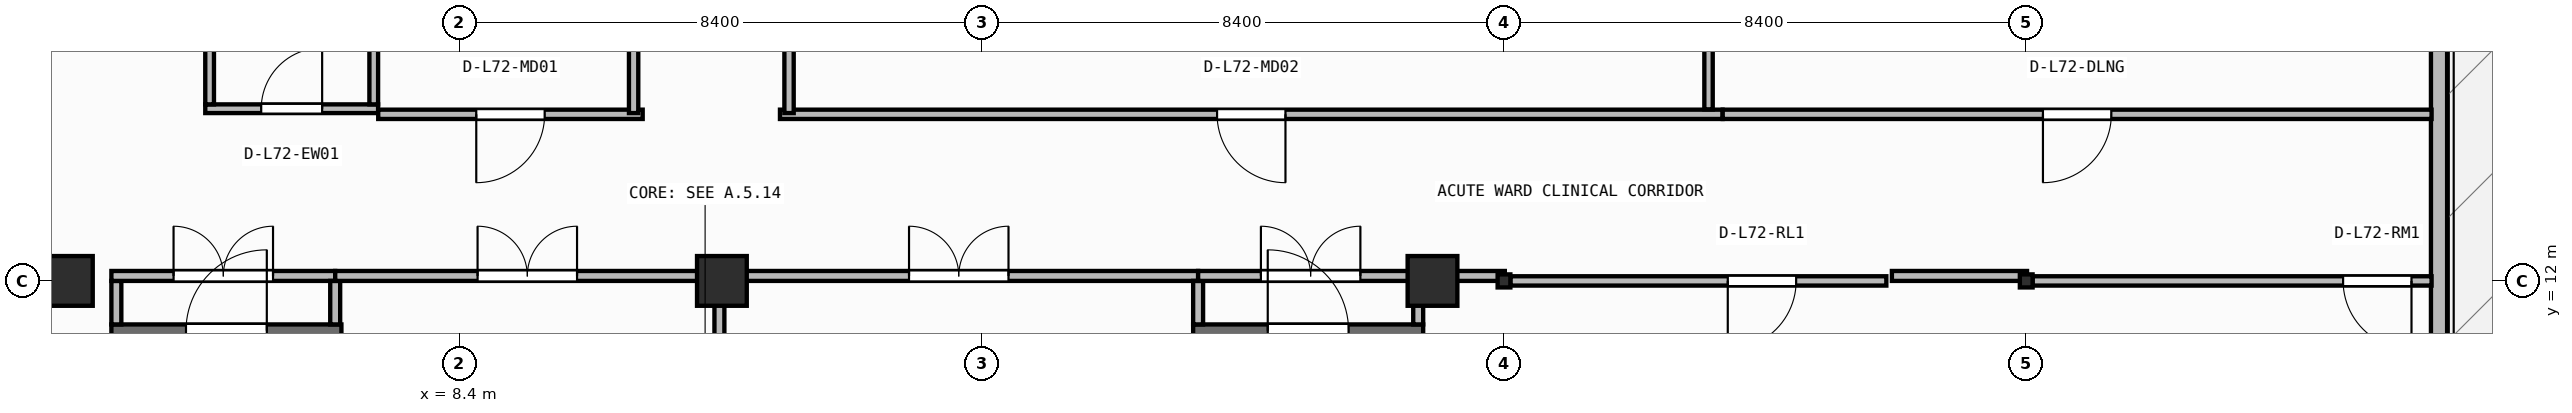
"""IFC4 building model, lengths in metres.
Left out: names, types, materials, properties, quantities, classifications, styles, units other than length and angle.
Written with IfcOpenShell. Run it as: python <this file> out.ifc"""

import sys

from ifc_helpers import new_model, si_unit, direction, frame, frame_2d, origin, origin_2d, place, context, subcontext, project, spatial, rectangle, i_section, extrude, element, fill, save


model = new_model("IFC4")
c1 = context("Model", 3, precision=1e-05, world=origin(), true_north=direction((0.0, 1.0)))
c2 = subcontext(c1, "Body", "Model", "MODEL_VIEW")
j1 = project(units=[si_unit("LENGTHUNIT", "METRE"), si_unit("PLANEANGLEUNIT", "RADIAN")], contexts=[c1])
p1 = place(None, origin())
s1 = spatial("IfcSite", under=j1, at=p1, CompositionType="ELEMENT")
p2 = place(p1, origin())
s2 = spatial("IfcBuilding", under=s1, at=p2, CompositionType="ELEMENT")
p3 = place(p2, frame((0.0, 0.0, 292.1)))
s3 = spatial("IfcBuildingStorey", under=s2, at=p3, CompositionType="ELEMENT", Elevation=292.1)
for number, where, z_axis, x_axis in (
    (1, (2.1, 12.0, 0.0), (0.0, 0.0, 1.0), (1.0, 0.0, 0.0)),
    (2, (12.62, 12.0, 0.0), (0.0, 0.0, 1.0), (1.0, 0.0, 0.0)),
    (3, (24.05, 12.0, 0.0), (0.0, 0.0, 1.0), (1.0, 0.0, 0.0)),
):
    element("IfcColumn", number, at=place(p3, frame(where, z_axis=z_axis, x_axis=x_axis)), inside=s3, PredefinedType="COLUMN", context=c2, shape_type="SweptSolid", body=[
        extrude(rectangle(XDim=0.8, YDim=0.8, at=origin_2d()), origin(), (0.0, 0.0, 1.0), 3.95),
    ])
for number, where, z_axis, x_axis in (
    (4, (25.2, 12.0, 0.0), (0.0, 0.0, 1.0), (1.0, 0.0, 0.0)),
    (5, (33.6, 12.0, 0.0), (0.0, 0.0, 1.0), (1.0, 0.0, 0.0)),
):
    element("IfcColumn", number, at=place(p3, frame(where, z_axis=z_axis, x_axis=x_axis)), inside=s3, PredefinedType="COLUMN", context=c2, shape_type="SweptSolid", body=[
        extrude(i_section(OverallWidth=0.205, OverallDepth=0.21, WebThickness=0.009, FlangeThickness=0.014, FilletRadius=0.011, at=origin_2d()), origin(), (0.0, 0.0, 1.0), 3.95),
    ])
p4 = place(p3, frame((40.24, 4.86, 0.0), z_axis=(0.0, 0.0, 1.0), x_axis=(0.0, 1.0, 0.0)))
e6 = element("IfcWall", 6, at=p4, inside=s3, PredefinedType="STANDARD", context=c2, shape_type="SweptSolid", body=[
    extrude(rectangle(XDim=20.48, YDim=0.26, at=frame_2d((10.24, 0.0))), origin(), (0.0, 0.0, 1.0), 3.71),
])
p5 = place(p4, frame((11.44, 0.0, 0.0)))
e7 = element("IfcOpeningElement", 7, at=p5, cuts=e6, PredefinedType="OPENING", context=c2, shape_type="SweptSolid", body=[
    extrude(rectangle(XDim=1.3, YDim=2.15, at=frame_2d((0.65, 1.075))), frame((0.0, 0.14, 0.0), z_axis=(0.0, -1.0, 0.0), x_axis=(1.0, 0.0, 0.0)), (0.0, 0.0, 1.0), 0.28),
])
p6 = place(p3, frame((2.8, 11.2, 0.0), z_axis=(0.0, 0.0, 1.0), x_axis=(1.0, 0.0, 0.0)))
e8 = element("IfcWall", 8, at=p6, inside=s3, PredefinedType="SHEAR", context=c2, shape_type="SweptSolid", body=[
    extrude(rectangle(XDim=3.7, YDim=0.2, at=frame_2d((1.85, 0.0))), origin(), (0.0, 0.0, 1.0), 3.71),
])
p7 = place(p6, frame((1.2, 0.0, 0.0)))
e9 = element("IfcOpeningElement", 9, at=p7, cuts=e8, PredefinedType="OPENING", context=c2, shape_type="SweptSolid", body=[
    extrude(rectangle(XDim=1.3, YDim=2.15, at=frame_2d((0.65, 1.075))), frame((0.0, 0.11, 0.0), z_axis=(0.0, -1.0, 0.0), x_axis=(1.0, 0.0, 0.0)), (0.0, 0.0, 1.0), 0.22),
])
p8 = place(p3, frame((20.2, 11.2, 0.0), z_axis=(0.0, 0.0, 1.0), x_axis=(1.0, 0.0, 0.0)))
e10 = element("IfcWall", 10, at=p8, inside=s3, PredefinedType="SHEAR", context=c2, shape_type="SweptSolid", body=[
    extrude(rectangle(XDim=3.7, YDim=0.2, at=frame_2d((1.85, 0.0))), origin(), (0.0, 0.0, 1.0), 3.71),
])
p9 = place(p8, frame((1.2, 0.0, 0.0)))
e11 = element("IfcOpeningElement", 11, at=p9, cuts=e10, PredefinedType="OPENING", context=c2, shape_type="SweptSolid", body=[
    extrude(rectangle(XDim=1.3, YDim=2.15, at=frame_2d((0.65, 1.075))), frame((0.0, 0.11, 0.0), z_axis=(0.0, -1.0, 0.0), x_axis=(1.0, 0.0, 0.0)), (0.0, 0.0, 1.0), 0.22),
])
p10 = place(p3, frame((2.88, 11.3, 0.0), z_axis=(0.0, 0.0, 1.0), x_axis=(0.0, 1.0, 0.0)))
e12 = element("IfcWall", 12, at=p10, inside=s3, PredefinedType="PARTITIONING", context=c2, shape_type="SweptSolid", body=[
    extrude(rectangle(XDim=0.7, YDim=0.16, at=frame_2d((0.35, 0.0))), origin(), (0.0, 0.0, 1.0), 3.71),
])
p11 = place(p3, frame((2.8, 12.08, 0.0), z_axis=(0.0, 0.0, 1.0), x_axis=(1.0, 0.0, 0.0)))
e13 = element("IfcWall", 13, at=p11, inside=s3, PredefinedType="PARTITIONING", context=c2, shape_type="SweptSolid", body=[
    extrude(rectangle(XDim=3.6, YDim=0.16, at=frame_2d((1.8, 0.0))), origin(), (0.0, 0.0, 1.0), 3.157),
])
p12 = place(p11, frame((1.0, 0.0, 0.0)))
e14 = element("IfcOpeningElement", 14, at=p12, cuts=e13, PredefinedType="OPENING", context=c2, shape_type="SweptSolid", body=[
    extrude(rectangle(XDim=1.6, YDim=2.05, at=frame_2d((0.8, 1.025))), frame((0.0, 0.09, 0.0), z_axis=(0.0, -1.0, 0.0), x_axis=(1.0, 0.0, 0.0)), (0.0, 0.0, 1.0), 0.18),
])
p13 = place(p3, frame((6.4, 11.3, 0.0), z_axis=(0.0, 0.0, 1.0), x_axis=(0.0, 1.0, 0.0)))
e15 = element("IfcWall", 15, at=p13, inside=s3, PredefinedType="PARTITIONING", context=c2, shape_type="SweptSolid", body=[
    extrude(rectangle(XDim=0.7, YDim=0.16, at=frame_2d((0.35, 0.0))), origin(), (0.0, 0.0, 1.0), 3.71),
])
p14 = place(p3, frame((6.4, 12.08, 0.0), z_axis=(0.0, 0.0, 1.0), x_axis=(1.0, 0.0, 0.0)))
e16 = element("IfcWall", 16, at=p14, inside=s3, PredefinedType="PARTITIONING", context=c2, shape_type="SweptSolid", body=[
    extrude(rectangle(XDim=6.18, YDim=0.16, at=frame_2d((3.09, 0.0))), origin(), (0.0, 0.0, 1.0), 3.157),
])
p15 = place(p14, frame((2.29, 0.0, 0.0)))
e17 = element("IfcOpeningElement", 17, at=p15, cuts=e16, PredefinedType="OPENING", context=c2, shape_type="SweptSolid", body=[
    extrude(rectangle(XDim=1.6, YDim=2.05, at=frame_2d((0.8, 1.025))), frame((0.0, 0.09, 0.0), z_axis=(0.0, -1.0, 0.0), x_axis=(1.0, 0.0, 0.0)), (0.0, 0.0, 1.0), 0.18),
])
p16 = place(p3, frame((12.58, 9.21, 0.0), z_axis=(0.0, 0.0, 1.0), x_axis=(0.0, 1.0, 0.0)))
e18 = element("IfcWall", 18, at=p16, inside=s3, PredefinedType="PARTITIONING", context=c2, shape_type="SweptSolid", body=[
    extrude(rectangle(XDim=2.79, YDim=0.16, at=frame_2d((1.395, 0.0))), origin(), (0.0, 0.0, 1.0), 3.71),
])
p17 = place(p3, frame((12.58, 12.08, 0.0), z_axis=(0.0, 0.0, 1.0), x_axis=(1.0, 0.0, 0.0)))
e19 = element("IfcWall", 19, at=p17, inside=s3, PredefinedType="PARTITIONING", context=c2, shape_type="SweptSolid", body=[
    extrude(rectangle(XDim=7.7, YDim=0.16, at=frame_2d((3.85, 0.0))), origin(), (0.0, 0.0, 1.0), 3.157),
])
p18 = place(p17, frame((3.05, 0.0, 0.0)))
e20 = element("IfcOpeningElement", 20, at=p18, cuts=e19, PredefinedType="OPENING", context=c2, shape_type="SweptSolid", body=[
    extrude(rectangle(XDim=1.6, YDim=2.05, at=frame_2d((0.8, 1.025))), frame((0.0, 0.09, 0.0), z_axis=(0.0, -1.0, 0.0), x_axis=(1.0, 0.0, 0.0)), (0.0, 0.0, 1.0), 0.18),
])
p19 = place(p3, frame((20.28, 11.3, 0.0), z_axis=(0.0, 0.0, 1.0), x_axis=(0.0, 1.0, 0.0)))
e21 = element("IfcWall", 21, at=p19, inside=s3, PredefinedType="PARTITIONING", context=c2, shape_type="SweptSolid", body=[
    extrude(rectangle(XDim=0.7, YDim=0.16, at=frame_2d((0.35, 0.0))), origin(), (0.0, 0.0, 1.0), 3.71),
])
p20 = place(p3, frame((20.28, 12.08, 0.0), z_axis=(0.0, 0.0, 1.0), x_axis=(1.0, 0.0, 0.0)))
e22 = element("IfcWall", 22, at=p20, inside=s3, PredefinedType="PARTITIONING", context=c2, shape_type="SweptSolid", body=[
    extrude(rectangle(XDim=3.62, YDim=0.16, at=frame_2d((1.81, 0.0))), origin(), (0.0, 0.0, 1.0), 3.157),
])
p21 = place(p20, frame((1.01, 0.0, 0.0)))
e23 = element("IfcOpeningElement", 23, at=p21, cuts=e22, PredefinedType="OPENING", context=c2, shape_type="SweptSolid", body=[
    extrude(rectangle(XDim=1.6, YDim=2.05, at=frame_2d((0.8, 1.025))), frame((0.0, 0.09, 0.0), z_axis=(0.0, -1.0, 0.0), x_axis=(1.0, 0.0, 0.0)), (0.0, 0.0, 1.0), 0.18),
])
p22 = place(p3, frame((23.82, 11.3, 0.0), z_axis=(0.0, 0.0, 1.0), x_axis=(0.0, 1.0, 0.0)))
e24 = element("IfcWall", 24, at=p22, inside=s3, PredefinedType="PARTITIONING", context=c2, shape_type="SweptSolid", body=[
    extrude(rectangle(XDim=0.7, YDim=0.16, at=frame_2d((0.35, 0.0))), origin(), (0.0, 0.0, 1.0), 3.71),
])
p23 = place(p3, frame((4.31, 14.77, 0.0), z_axis=(0.0, 0.0, 1.0), x_axis=(1.0, 0.0, 0.0)))
e25 = element("IfcWall", 25, at=p23, inside=s3, PredefinedType="PARTITIONING", context=c2, shape_type="SweptSolid", body=[
    extrude(rectangle(XDim=2.78, YDim=0.14, at=frame_2d((1.39, 0.0))), origin(), (0.0, 0.0, 1.0), 3.71),
])
p24 = place(p23, frame((0.9, 0.0, 0.0)))
e26 = element("IfcOpeningElement", 26, at=p24, cuts=e25, PredefinedType="OPENING", context=c2, shape_type="SweptSolid", body=[
    extrude(rectangle(XDim=0.98, YDim=2.1, at=frame_2d((0.49, 1.05))), frame((0.0, 0.08, 0.0), z_axis=(0.0, -1.0, 0.0), x_axis=(1.0, 0.0, 0.0)), (0.0, 0.0, 1.0), 0.16),
])
for number, where, z_axis, x_axis in (
    (27, (4.38, 14.84, 0.0), (0.0, 0.0, 1.0), (0.0, 1.0, 0.0)),
    (28, (7.02, 14.84, 0.0), (0.0, 0.0, 1.0), (0.0, 1.0, 0.0)),
):
    element("IfcWall", number, at=place(p3, frame(where, z_axis=z_axis, x_axis=x_axis)), inside=s3, PredefinedType="PARTITIONING", context=c2, shape_type="SweptSolid", body=[
        extrude(rectangle(XDim=2.2, YDim=0.14, at=frame_2d((1.1, 0.0))), origin(), (0.0, 0.0, 1.0), 3.71),
    ])
p25 = place(p3, frame((31.35, 12.0, 0.0), z_axis=(0.0, 0.0, 1.0), x_axis=(-1.0, 0.0, 0.0)))
e29 = element("IfcWall", 29, at=p25, inside=s3, PredefinedType="PARTITIONING", context=c2, shape_type="SweptSolid", body=[
    extrude(rectangle(XDim=6.048, YDim=0.15, at=frame_2d((3.024, 0.0))), origin(), (0.0, 0.0, 1.0), 3.157),
])
p26 = place(p25, frame((1.451, 0.0, 0.0)))
e30 = element("IfcOpeningElement", 30, at=p26, cuts=e29, PredefinedType="OPENING", context=c2, shape_type="SweptSolid", body=[
    extrude(rectangle(XDim=1.1, YDim=2.1, at=frame_2d((0.55, 1.05))), frame((0.0, 0.085, 0.0), z_axis=(0.0, -1.0, 0.0), x_axis=(1.0, 0.0, 0.0)), (0.0, 0.0, 1.0), 0.17),
])
p27 = place(p3, frame((40.12, 12.0, 0.0), z_axis=(0.0, 0.0, 1.0), x_axis=(-1.0, 0.0, 0.0)))
e31 = element("IfcWall", 31, at=p27, inside=s3, PredefinedType="PARTITIONING", context=c2, shape_type="SweptSolid", body=[
    extrude(rectangle(XDim=6.418, YDim=0.15, at=frame_2d((3.209, 0.0))), origin(), (0.0, 0.0, 1.0), 3.71),
])
p28 = place(p27, frame((0.323, 0.0, 0.0)))
e32 = element("IfcOpeningElement", 32, at=p28, cuts=e31, PredefinedType="OPENING", context=c2, shape_type="SweptSolid", body=[
    extrude(rectangle(XDim=1.1, YDim=2.1, at=frame_2d((0.55, 1.05))), frame((0.0, 0.085, 0.0), z_axis=(0.0, -1.0, 0.0), x_axis=(1.0, 0.0, 0.0)), (0.0, 0.0, 1.0), 0.17),
])
p29 = place(p3, frame((11.346, 14.68, 0.0), z_axis=(0.0, 0.0, 1.0), x_axis=(-1.0, 0.0, 0.0)))
e33 = element("IfcWall", 33, at=p29, inside=s3, PredefinedType="PARTITIONING", context=c2, shape_type="SweptSolid", body=[
    extrude(rectangle(XDim=4.254, YDim=0.15, at=frame_2d((2.127, 0.0))), origin(), (0.0, 0.0, 1.0), 3.71),
])
p30 = place(p29, frame((1.577, 0.0, 0.0)))
e34 = element("IfcOpeningElement", 34, at=p30, cuts=e33, PredefinedType="OPENING", context=c2, shape_type="SweptSolid", body=[
    extrude(rectangle(XDim=1.1, YDim=2.1, at=frame_2d((0.55, 1.05))), frame((0.0, 0.085, 0.0), z_axis=(0.0, -1.0, 0.0), x_axis=(1.0, 0.0, 0.0)), (0.0, 0.0, 1.0), 0.17),
])
p31 = place(p3, frame((28.716, 14.68, 0.0), z_axis=(0.0, 0.0, 1.0), x_axis=(-1.0, 0.0, 0.0)))
e35 = element("IfcWall", 35, at=p31, inside=s3, PredefinedType="PARTITIONING", context=c2, shape_type="SweptSolid", body=[
    extrude(rectangle(XDim=15.162, YDim=0.15, at=frame_2d((7.581, 0.0))), origin(), (0.0, 0.0, 1.0), 3.71),
])
p32 = place(p31, frame((7.031, 0.0, 0.0)))
e36 = element("IfcOpeningElement", 36, at=p32, cuts=e35, PredefinedType="OPENING", context=c2, shape_type="SweptSolid", body=[
    extrude(rectangle(XDim=1.1, YDim=2.1, at=frame_2d((0.55, 1.05))), frame((0.0, 0.085, 0.0), z_axis=(0.0, -1.0, 0.0), x_axis=(1.0, 0.0, 0.0)), (0.0, 0.0, 1.0), 0.17),
])
p33 = place(p3, frame((40.12, 14.68, 0.0), z_axis=(0.0, 0.0, 1.0), x_axis=(-1.0, 0.0, 0.0)))
e37 = element("IfcWall", 37, at=p33, inside=s3, PredefinedType="PARTITIONING", context=c2, shape_type="SweptSolid", body=[
    extrude(rectangle(XDim=11.402, YDim=0.15, at=frame_2d((5.701, 0.0))), origin(), (0.0, 0.0, 1.0), 3.71),
])
p34 = place(p33, frame((5.151, 0.0, 0.0)))
e38 = element("IfcOpeningElement", 38, at=p34, cuts=e37, PredefinedType="OPENING", context=c2, shape_type="SweptSolid", body=[
    extrude(rectangle(XDim=1.1, YDim=2.1, at=frame_2d((0.55, 1.05))), frame((0.0, 0.085, 0.0), z_axis=(0.0, -1.0, 0.0), x_axis=(1.0, 0.0, 0.0)), (0.0, 0.0, 1.0), 0.17),
])
p35 = place(p3, frame((11.2, 26.6, 0.0), z_axis=(0.0, 0.0, 1.0), x_axis=(0.0, -1.0, 0.0)))
e39 = element("IfcWall", 39, at=p35, inside=s3, PredefinedType="PARTITIONING", context=c2, shape_type="SweptSolid", body=[
    extrude(rectangle(XDim=11.9, YDim=0.15, at=frame_2d((5.95, 0.0))), origin(), (0.0, 0.0, 1.0), 3.71),
])
p36 = place(p3, frame((13.7, 14.7, 0.0), z_axis=(0.0, 0.0, 1.0), x_axis=(0.0, 1.0, 0.0)))
e40 = element("IfcWall", 40, at=p36, inside=s3, PredefinedType="PARTITIONING", context=c2, shape_type="SweptSolid", body=[
    extrude(rectangle(XDim=5.326, YDim=0.15, at=frame_2d((2.663, 0.0))), origin(), (0.0, 0.0, 1.0), 3.71),
])
p37 = place(p3, frame((28.49, 14.76, 0.0), z_axis=(0.0, 0.0, 1.0), x_axis=(0.0, 1.0, 0.0)))
e41 = element("IfcWall", 41, at=p37, inside=s3, PredefinedType="PARTITIONING", context=c2, shape_type="SweptSolid", body=[
    extrude(rectangle(XDim=5.04, YDim=0.135, at=frame_2d((2.52, 0.0))), origin(), (0.0, 0.0, 1.0), 3.71),
])
p38 = place(p3, frame((24.02, 12.08, 0.0), z_axis=(0.0, 0.0, 1.0), x_axis=(1.0, 0.0, 0.0)))
e42 = element("IfcWall", 42, at=p38, inside=s3, PredefinedType="PARTITIONING", context=c2, shape_type="SweptSolid", body=[
    extrude(rectangle(XDim=1.193, YDim=0.16, at=frame_2d((0.597, 0.0))), origin(), (0.0, 0.0, 1.0), 3.157),
])
p39 = place(p3, frame((31.439, 12.08, 0.0), z_axis=(0.0, 0.0, 1.0), x_axis=(1.0, 0.0, 0.0)))
e43 = element("IfcWall", 43, at=p39, inside=s3, PredefinedType="PARTITIONING", context=c2, shape_type="SweptSolid", body=[
    extrude(rectangle(XDim=2.174, YDim=0.16, at=frame_2d((1.087, 0.0))), origin(), (0.0, 0.0, 1.0), 3.157),
])
p40 = place(p7, origin())
e44 = element("IfcDoor", 44, at=p40, inside=s3, OperationType="SINGLE_SWING_RIGHT", PredefinedType="DOOR", context=c2, shape_type="SweptSolid", body=[
    extrude(rectangle(XDim=1.3, YDim=2.15, at=frame_2d((0.65, 1.075))), frame((0.0, 0.025, 0.0), z_axis=(0.0, -1.0, 0.0), x_axis=(1.0, 0.0, 0.0)), (0.0, 0.0, 1.0), 0.05),
])
fill(e9, e44)
p41 = place(p9, origin())
e45 = element("IfcDoor", 45, at=p41, inside=s3, OperationType="SINGLE_SWING_LEFT", PredefinedType="DOOR", context=c2, shape_type="SweptSolid", body=[
    extrude(rectangle(XDim=1.3, YDim=2.15, at=frame_2d((0.65, 1.075))), frame((0.0, 0.025, 0.0), z_axis=(0.0, -1.0, 0.0), x_axis=(1.0, 0.0, 0.0)), (0.0, 0.0, 1.0), 0.05),
])
fill(e11, e45)
p42 = place(p12, origin())
e46 = element("IfcDoor", 46, at=p42, inside=s3, OperationType="DOUBLE_DOOR_SINGLE_SWING", PredefinedType="DOOR", context=c2, shape_type="SweptSolid", body=[
    extrude(rectangle(XDim=1.6, YDim=2.05, at=frame_2d((0.8, 1.025))), frame((0.0, 0.025, 0.0), z_axis=(0.0, -1.0, 0.0), x_axis=(1.0, 0.0, 0.0)), (0.0, 0.0, 1.0), 0.05),
])
fill(e14, e46)
p43 = place(p15, origin())
e47 = element("IfcDoor", 47, at=p43, inside=s3, OperationType="DOUBLE_DOOR_SINGLE_SWING", PredefinedType="DOOR", context=c2, shape_type="SweptSolid", body=[
    extrude(rectangle(XDim=1.6, YDim=2.05, at=frame_2d((0.8, 1.025))), frame((0.0, 0.025, 0.0), z_axis=(0.0, -1.0, 0.0), x_axis=(1.0, 0.0, 0.0)), (0.0, 0.0, 1.0), 0.05),
])
fill(e17, e47)
p44 = place(p18, origin())
e48 = element("IfcDoor", 48, at=p44, inside=s3, OperationType="DOUBLE_DOOR_SINGLE_SWING", PredefinedType="DOOR", context=c2, shape_type="SweptSolid", body=[
    extrude(rectangle(XDim=1.6, YDim=2.05, at=frame_2d((0.8, 1.025))), frame((0.0, 0.025, 0.0), z_axis=(0.0, -1.0, 0.0), x_axis=(1.0, 0.0, 0.0)), (0.0, 0.0, 1.0), 0.05),
])
fill(e20, e48)
p45 = place(p21, origin())
e49 = element("IfcDoor", 49, at=p45, inside=s3, OperationType="DOUBLE_DOOR_SINGLE_SWING", PredefinedType="DOOR", context=c2, shape_type="SweptSolid", body=[
    extrude(rectangle(XDim=1.6, YDim=2.05, at=frame_2d((0.8, 1.025))), frame((0.0, 0.025, 0.0), z_axis=(0.0, -1.0, 0.0), x_axis=(1.0, 0.0, 0.0)), (0.0, 0.0, 1.0), 0.05),
])
fill(e23, e49)
p46 = place(p24, origin())
e50 = element("IfcDoor", 50, at=p46, inside=s3, OperationType="SINGLE_SWING_RIGHT", PredefinedType="DOOR", context=c2, shape_type="SweptSolid", body=[
    extrude(rectangle(XDim=0.98, YDim=2.1, at=frame_2d((0.49, 1.05))), frame((0.0, 0.025, 0.0), z_axis=(0.0, -1.0, 0.0), x_axis=(1.0, 0.0, 0.0)), (0.0, 0.0, 1.0), 0.05),
])
fill(e26, e50)
p47 = place(p26, origin())
e51 = element("IfcDoor", 51, at=p47, inside=s3, OperationType="SINGLE_SWING_RIGHT", PredefinedType="DOOR", context=c2, shape_type="SweptSolid", body=[
    extrude(rectangle(XDim=1.1, YDim=2.1, at=frame_2d((0.55, 1.05))), frame((0.0, 0.025, 0.0), z_axis=(0.0, -1.0, 0.0), x_axis=(1.0, 0.0, 0.0)), (0.0, 0.0, 1.0), 0.05),
])
fill(e30, e51)
p48 = place(p28, origin())
e52 = element("IfcDoor", 52, at=p48, inside=s3, OperationType="SINGLE_SWING_LEFT", PredefinedType="DOOR", context=c2, shape_type="SweptSolid", body=[
    extrude(rectangle(XDim=1.1, YDim=2.1, at=frame_2d((0.55, 1.05))), frame((0.0, 0.025, 0.0), z_axis=(0.0, -1.0, 0.0), x_axis=(1.0, 0.0, 0.0)), (0.0, 0.0, 1.0), 0.05),
])
fill(e32, e52)
p49 = place(p30, origin())
e53 = element("IfcDoor", 53, at=p49, inside=s3, OperationType="SINGLE_SWING_RIGHT", PredefinedType="DOOR", context=c2, shape_type="SweptSolid", body=[
    extrude(rectangle(XDim=1.1, YDim=2.1, at=frame_2d((0.55, 1.05))), frame((0.0, 0.025, 0.0), z_axis=(0.0, -1.0, 0.0), x_axis=(1.0, 0.0, 0.0)), (0.0, 0.0, 1.0), 0.05),
])
fill(e34, e53)
p50 = place(p32, origin())
e54 = element("IfcDoor", 54, at=p50, inside=s3, OperationType="SINGLE_SWING_LEFT", PredefinedType="DOOR", context=c2, shape_type="SweptSolid", body=[
    extrude(rectangle(XDim=1.1, YDim=2.1, at=frame_2d((0.55, 1.05))), frame((0.0, 0.025, 0.0), z_axis=(0.0, -1.0, 0.0), x_axis=(1.0, 0.0, 0.0)), (0.0, 0.0, 1.0), 0.05),
])
fill(e36, e54)
p51 = place(p34, origin())
e55 = element("IfcDoor", 55, at=p51, inside=s3, OperationType="SINGLE_SWING_RIGHT", PredefinedType="DOOR", context=c2, shape_type="SweptSolid", body=[
    extrude(rectangle(XDim=1.1, YDim=2.1, at=frame_2d((0.55, 1.05))), frame((0.0, 0.025, 0.0), z_axis=(0.0, -1.0, 0.0), x_axis=(1.0, 0.0, 0.0)), (0.0, 0.0, 1.0), 0.05),
])
fill(e38, e55)
save(model, sys.argv[1])
